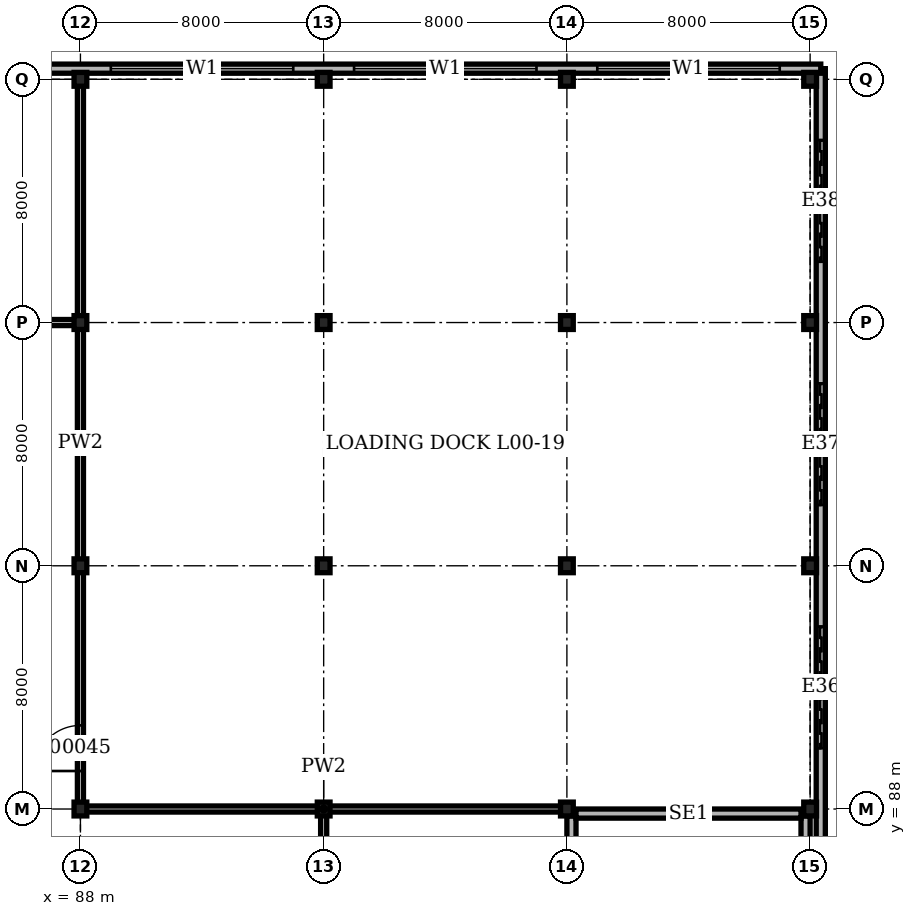
"""IFC4 building model, lengths in metres.
Left out: names, types, materials, properties, quantities, classifications, styles, units other than length and angle.
Written with IfcOpenShell. Run it as: python <this file> out.ifc"""

import sys

from ifc_helpers import new_model, si_unit, direction, frame, frame_2d, origin, origin_2d, place, context, subcontext, project, spatial, rectangle, i_section, extrude, element, fill, save


model = new_model("IFC4")
c1 = context("Model", 3, precision=1e-05, world=origin(), true_north=direction((0.0, 1.0)))
c2 = subcontext(c1, "Body", "Model", "MODEL_VIEW")
j1 = project(units=[si_unit("LENGTHUNIT", "METRE"), si_unit("PLANEANGLEUNIT", "RADIAN")], contexts=[c1])
p1 = place(None, origin())
s1 = spatial("IfcSite", under=j1, at=p1, CompositionType="ELEMENT")
p2 = place(p1, origin())
s2 = spatial("IfcBuilding", under=s1, at=p2, CompositionType="ELEMENT")
p3 = place(p2, origin())
s3 = spatial("IfcBuildingStorey", under=s2, at=p3, CompositionType="ELEMENT", Elevation=0.0)
for number, where, z_axis, x_axis in (
    (1, (88.0, 88.0, 0.0), (0.0, 0.0, 1.0), (1.0, 0.0, 0.0)),
    (2, (88.0, 96.0, 0.0), (0.0, 0.0, 1.0), (1.0, 0.0, 0.0)),
    (3, (88.0, 104.0, 0.0), (0.0, 0.0, 1.0), (1.0, 0.0, 0.0)),
    (4, (88.0, 112.0, 0.0), (0.0, 0.0, 1.0), (1.0, 0.0, 0.0)),
    (5, (96.0, 88.0, 0.0), (0.0, 0.0, 1.0), (1.0, 0.0, 0.0)),
    (6, (96.0, 96.0, 0.0), (0.0, 0.0, 1.0), (1.0, 0.0, 0.0)),
    (7, (96.0, 104.0, 0.0), (0.0, 0.0, 1.0), (1.0, 0.0, 0.0)),
    (8, (96.0, 112.0, 0.0), (0.0, 0.0, 1.0), (1.0, 0.0, 0.0)),
    (9, (104.0, 88.0, 0.0), (0.0, 0.0, 1.0), (1.0, 0.0, 0.0)),
    (10, (104.0, 96.0, 0.0), (0.0, 0.0, 1.0), (1.0, 0.0, 0.0)),
    (11, (104.0, 104.0, 0.0), (0.0, 0.0, 1.0), (1.0, 0.0, 0.0)),
    (12, (104.0, 112.0, 0.0), (0.0, 0.0, 1.0), (1.0, 0.0, 0.0)),
    (13, (112.0, 88.0, 0.0), (0.0, 0.0, 1.0), (1.0, 0.0, 0.0)),
    (14, (112.0, 96.0, 0.0), (0.0, 0.0, 1.0), (1.0, 0.0, 0.0)),
    (15, (112.0, 104.0, 0.0), (0.0, 0.0, 1.0), (1.0, 0.0, 0.0)),
    (16, (112.0, 112.0, 0.0), (0.0, 0.0, 1.0), (1.0, 0.0, 0.0)),
):
    element("IfcColumn", number, at=place(p3, frame(where, z_axis=z_axis, x_axis=x_axis)), inside=s3, PredefinedType="COLUMN", context=c2, shape_type="SweptSolid", body=[
        extrude(i_section(OverallWidth=0.419, OverallDepth=0.455, WebThickness=0.042, FlangeThickness=0.068, at=origin_2d()), origin(), (0.0, 0.0, 1.0), 4.9),
    ])
p4 = place(p3, frame((112.35, -0.35, 0.0), z_axis=(0.0, 0.0, 1.0), x_axis=(0.0, 1.0, 0.0)))
e17 = element("IfcWall", 17, at=p4, inside=s3, PredefinedType="SOLIDWALL", context=c2, shape_type="SweptSolid", body=[
    extrude(rectangle(XDim=112.7, YDim=0.3, at=frame_2d((56.35, 0.0))), origin(), (0.0, 0.0, 1.0), 4.9),
])
p5 = place(p4, frame((3.45, 0.0, 0.0)))
e18 = element("IfcOpeningElement", 18, at=p5, cuts=e17, PredefinedType="OPENING", context=c2, shape_type="SweptSolid", body=[
    extrude(rectangle(XDim=1.8, YDim=2.4, at=frame_2d((0.9, 1.2))), frame((0.0, 0.16, 0.0), z_axis=(0.0, -1.0, 0.0), x_axis=(1.0, 0.0, 0.0)), (0.0, 0.0, 1.0), 0.32),
])
p6 = place(p4, frame((11.45, 0.0, 0.0)))
e19 = element("IfcOpeningElement", 19, at=p6, cuts=e17, PredefinedType="OPENING", context=c2, shape_type="SweptSolid", body=[
    extrude(rectangle(XDim=1.8, YDim=2.4, at=frame_2d((0.9, 1.2))), frame((0.0, 0.16, 0.0), z_axis=(0.0, -1.0, 0.0), x_axis=(1.0, 0.0, 0.0)), (0.0, 0.0, 1.0), 0.32),
])
p7 = place(p4, frame((17.35, 0.0, 1.2)))
e20 = element("IfcOpeningElement", 20, at=p7, cuts=e17, PredefinedType="OPENING", context=c2, shape_type="SweptSolid", body=[
    extrude(rectangle(XDim=6.0, YDim=1.5, at=frame_2d((3.0, 0.75))), frame((0.0, 0.16, 0.0), z_axis=(0.0, -1.0, 0.0), x_axis=(1.0, 0.0, 0.0)), (0.0, 0.0, 1.0), 0.32),
])
p8 = place(p4, frame((25.35, 0.0, 1.2)))
e21 = element("IfcOpeningElement", 21, at=p8, cuts=e17, PredefinedType="OPENING", context=c2, shape_type="SweptSolid", body=[
    extrude(rectangle(XDim=6.0, YDim=1.5, at=frame_2d((3.0, 0.75))), frame((0.0, 0.16, 0.0), z_axis=(0.0, -1.0, 0.0), x_axis=(1.0, 0.0, 0.0)), (0.0, 0.0, 1.0), 0.32),
])
p9 = place(p4, frame((33.35, 0.0, 1.2)))
e22 = element("IfcOpeningElement", 22, at=p9, cuts=e17, PredefinedType="OPENING", context=c2, shape_type="SweptSolid", body=[
    extrude(rectangle(XDim=6.0, YDim=1.5, at=frame_2d((3.0, 0.75))), frame((0.0, 0.16, 0.0), z_axis=(0.0, -1.0, 0.0), x_axis=(1.0, 0.0, 0.0)), (0.0, 0.0, 1.0), 0.32),
])
p10 = place(p4, frame((41.35, 0.0, 1.2)))
e23 = element("IfcOpeningElement", 23, at=p10, cuts=e17, PredefinedType="OPENING", context=c2, shape_type="SweptSolid", body=[
    extrude(rectangle(XDim=6.0, YDim=1.5, at=frame_2d((3.0, 0.75))), frame((0.0, 0.16, 0.0), z_axis=(0.0, -1.0, 0.0), x_axis=(1.0, 0.0, 0.0)), (0.0, 0.0, 1.0), 0.32),
])
p11 = place(p4, frame((49.45, 0.0, 0.0)))
e24 = element("IfcOpeningElement", 24, at=p11, cuts=e17, PredefinedType="OPENING", context=c2, shape_type="SweptSolid", body=[
    extrude(rectangle(XDim=1.8, YDim=2.4, at=frame_2d((0.9, 1.2))), frame((0.0, 0.16, 0.0), z_axis=(0.0, -1.0, 0.0), x_axis=(1.0, 0.0, 0.0)), (0.0, 0.0, 1.0), 0.32),
])
p12 = place(p4, frame((53.45, 0.0, 0.0)))
e25 = element("IfcOpeningElement", 25, at=p12, cuts=e17, PredefinedType="OPENING", context=c2, shape_type="SweptSolid", body=[
    extrude(rectangle(XDim=1.8, YDim=2.4, at=frame_2d((0.9, 1.2))), frame((0.0, 0.16, 0.0), z_axis=(0.0, -1.0, 0.0), x_axis=(1.0, 0.0, 0.0)), (0.0, 0.0, 1.0), 0.32),
])
p13 = place(p4, frame((57.35, 0.0, 1.2)))
e26 = element("IfcOpeningElement", 26, at=p13, cuts=e17, PredefinedType="OPENING", context=c2, shape_type="SweptSolid", body=[
    extrude(rectangle(XDim=6.0, YDim=1.5, at=frame_2d((3.0, 0.75))), frame((0.0, 0.16, 0.0), z_axis=(0.0, -1.0, 0.0), x_axis=(1.0, 0.0, 0.0)), (0.0, 0.0, 1.0), 0.32),
])
p14 = place(p4, frame((65.15, 0.0, 0.0)))
e27 = element("IfcOpeningElement", 27, at=p14, cuts=e17, PredefinedType="OPENING", context=c2, shape_type="SweptSolid", body=[
    extrude(rectangle(XDim=2.4, YDim=3.0, at=frame_2d((1.2, 1.5))), frame((0.0, 0.16, 0.0), z_axis=(0.0, -1.0, 0.0), x_axis=(1.0, 0.0, 0.0)), (0.0, 0.0, 1.0), 0.32),
])
p15 = place(p4, frame((69.15, 0.0, 0.0)))
e28 = element("IfcOpeningElement", 28, at=p15, cuts=e17, PredefinedType="OPENING", context=c2, shape_type="SweptSolid", body=[
    extrude(rectangle(XDim=2.4, YDim=3.0, at=frame_2d((1.2, 1.5))), frame((0.0, 0.16, 0.0), z_axis=(0.0, -1.0, 0.0), x_axis=(1.0, 0.0, 0.0)), (0.0, 0.0, 1.0), 0.32),
])
p16 = place(p4, frame((74.05, 0.0, 0.0)))
e29 = element("IfcOpeningElement", 29, at=p16, cuts=e17, PredefinedType="OPENING", context=c2, shape_type="SweptSolid", body=[
    extrude(rectangle(XDim=1.8, YDim=2.4, at=frame_2d((0.9, 1.2))), frame((0.0, 0.16, 0.0), z_axis=(0.0, -1.0, 0.0), x_axis=(1.0, 0.0, 0.0)), (0.0, 0.0, 1.0), 0.32),
])
p17 = place(p4, frame((81.35, 0.0, 1.2)))
e30 = element("IfcOpeningElement", 30, at=p17, cuts=e17, PredefinedType="OPENING", context=c2, shape_type="SweptSolid", body=[
    extrude(rectangle(XDim=6.0, YDim=1.5, at=frame_2d((3.0, 0.75))), frame((0.0, 0.16, 0.0), z_axis=(0.0, -1.0, 0.0), x_axis=(1.0, 0.0, 0.0)), (0.0, 0.0, 1.0), 0.32),
])
p18 = place(p4, frame((90.35, 0.0, 0.0)))
e31 = element("IfcOpeningElement", 31, at=p18, cuts=e17, PredefinedType="OPENING", context=c2, shape_type="SweptSolid", body=[
    extrude(rectangle(XDim=4.0, YDim=4.5, at=frame_2d((2.0, 2.25))), frame((0.0, 0.16, 0.0), z_axis=(0.0, -1.0, 0.0), x_axis=(1.0, 0.0, 0.0)), (0.0, 0.0, 1.0), 0.32),
])
p19 = place(p4, frame((98.35, 0.0, 0.0)))
e32 = element("IfcOpeningElement", 32, at=p19, cuts=e17, PredefinedType="OPENING", context=c2, shape_type="SweptSolid", body=[
    extrude(rectangle(XDim=4.0, YDim=4.5, at=frame_2d((2.0, 2.25))), frame((0.0, 0.16, 0.0), z_axis=(0.0, -1.0, 0.0), x_axis=(1.0, 0.0, 0.0)), (0.0, 0.0, 1.0), 0.32),
])
p20 = place(p4, frame((106.35, 0.0, 0.0)))
e33 = element("IfcOpeningElement", 33, at=p20, cuts=e17, PredefinedType="OPENING", context=c2, shape_type="SweptSolid", body=[
    extrude(rectangle(XDim=4.0, YDim=4.5, at=frame_2d((2.0, 2.25))), frame((0.0, 0.16, 0.0), z_axis=(0.0, -1.0, 0.0), x_axis=(1.0, 0.0, 0.0)), (0.0, 0.0, 1.0), 0.32),
])
p21 = place(p3, frame((112.35, 112.35, 0.0), z_axis=(0.0, 0.0, 1.0), x_axis=(-1.0, 0.0, 0.0)))
e34 = element("IfcWall", 34, at=p21, inside=s3, PredefinedType="SOLIDWALL", context=c2, shape_type="SweptSolid", body=[
    extrude(rectangle(XDim=112.7, YDim=0.3, at=frame_2d((56.35, 0.0))), origin(), (0.0, 0.0, 1.0), 4.9),
])
p22 = place(p21, frame((1.35, 0.0, 1.2)))
e35 = element("IfcOpeningElement", 35, at=p22, cuts=e34, PredefinedType="OPENING", context=c2, shape_type="SweptSolid", body=[
    extrude(rectangle(XDim=6.0, YDim=1.5, at=frame_2d((3.0, 0.75))), frame((0.0, 0.16, 0.0), z_axis=(0.0, -1.0, 0.0), x_axis=(1.0, 0.0, 0.0)), (0.0, 0.0, 1.0), 0.32),
])
p23 = place(p21, frame((9.35, 0.0, 1.2)))
e36 = element("IfcOpeningElement", 36, at=p23, cuts=e34, PredefinedType="OPENING", context=c2, shape_type="SweptSolid", body=[
    extrude(rectangle(XDim=6.0, YDim=1.5, at=frame_2d((3.0, 0.75))), frame((0.0, 0.16, 0.0), z_axis=(0.0, -1.0, 0.0), x_axis=(1.0, 0.0, 0.0)), (0.0, 0.0, 1.0), 0.32),
])
p24 = place(p21, frame((17.35, 0.0, 1.2)))
e37 = element("IfcOpeningElement", 37, at=p24, cuts=e34, PredefinedType="OPENING", context=c2, shape_type="SweptSolid", body=[
    extrude(rectangle(XDim=6.0, YDim=1.5, at=frame_2d((3.0, 0.75))), frame((0.0, 0.16, 0.0), z_axis=(0.0, -1.0, 0.0), x_axis=(1.0, 0.0, 0.0)), (0.0, 0.0, 1.0), 0.32),
])
p25 = place(p21, frame((25.35, 0.0, 1.2)))
e38 = element("IfcOpeningElement", 38, at=p25, cuts=e34, PredefinedType="OPENING", context=c2, shape_type="SweptSolid", body=[
    extrude(rectangle(XDim=6.0, YDim=1.5, at=frame_2d((3.0, 0.75))), frame((0.0, 0.16, 0.0), z_axis=(0.0, -1.0, 0.0), x_axis=(1.0, 0.0, 0.0)), (0.0, 0.0, 1.0), 0.32),
])
p26 = place(p21, frame((33.35, 0.0, 1.2)))
e39 = element("IfcOpeningElement", 39, at=p26, cuts=e34, PredefinedType="OPENING", context=c2, shape_type="SweptSolid", body=[
    extrude(rectangle(XDim=6.0, YDim=1.5, at=frame_2d((3.0, 0.75))), frame((0.0, 0.16, 0.0), z_axis=(0.0, -1.0, 0.0), x_axis=(1.0, 0.0, 0.0)), (0.0, 0.0, 1.0), 0.32),
])
p27 = place(p21, frame((41.35, 0.0, 1.2)))
e40 = element("IfcOpeningElement", 40, at=p27, cuts=e34, PredefinedType="OPENING", context=c2, shape_type="SweptSolid", body=[
    extrude(rectangle(XDim=6.0, YDim=1.5, at=frame_2d((3.0, 0.75))), frame((0.0, 0.16, 0.0), z_axis=(0.0, -1.0, 0.0), x_axis=(1.0, 0.0, 0.0)), (0.0, 0.0, 1.0), 0.32),
])
p28 = place(p21, frame((49.35, 0.0, 1.2)))
e41 = element("IfcOpeningElement", 41, at=p28, cuts=e34, PredefinedType="OPENING", context=c2, shape_type="SweptSolid", body=[
    extrude(rectangle(XDim=6.0, YDim=1.5, at=frame_2d((3.0, 0.75))), frame((0.0, 0.16, 0.0), z_axis=(0.0, -1.0, 0.0), x_axis=(1.0, 0.0, 0.0)), (0.0, 0.0, 1.0), 0.32),
])
p29 = place(p21, frame((57.35, 0.0, 1.2)))
e42 = element("IfcOpeningElement", 42, at=p29, cuts=e34, PredefinedType="OPENING", context=c2, shape_type="SweptSolid", body=[
    extrude(rectangle(XDim=6.0, YDim=1.5, at=frame_2d((3.0, 0.75))), frame((0.0, 0.16, 0.0), z_axis=(0.0, -1.0, 0.0), x_axis=(1.0, 0.0, 0.0)), (0.0, 0.0, 1.0), 0.32),
])
p30 = place(p21, frame((65.35, 0.0, 1.2)))
e43 = element("IfcOpeningElement", 43, at=p30, cuts=e34, PredefinedType="OPENING", context=c2, shape_type="SweptSolid", body=[
    extrude(rectangle(XDim=6.0, YDim=1.5, at=frame_2d((3.0, 0.75))), frame((0.0, 0.16, 0.0), z_axis=(0.0, -1.0, 0.0), x_axis=(1.0, 0.0, 0.0)), (0.0, 0.0, 1.0), 0.32),
])
p31 = place(p21, frame((73.35, 0.0, 1.2)))
e44 = element("IfcOpeningElement", 44, at=p31, cuts=e34, PredefinedType="OPENING", context=c2, shape_type="SweptSolid", body=[
    extrude(rectangle(XDim=6.0, YDim=1.5, at=frame_2d((3.0, 0.75))), frame((0.0, 0.16, 0.0), z_axis=(0.0, -1.0, 0.0), x_axis=(1.0, 0.0, 0.0)), (0.0, 0.0, 1.0), 0.32),
])
p32 = place(p21, frame((81.35, 0.0, 1.2)))
e45 = element("IfcOpeningElement", 45, at=p32, cuts=e34, PredefinedType="OPENING", context=c2, shape_type="SweptSolid", body=[
    extrude(rectangle(XDim=6.0, YDim=1.5, at=frame_2d((3.0, 0.75))), frame((0.0, 0.16, 0.0), z_axis=(0.0, -1.0, 0.0), x_axis=(1.0, 0.0, 0.0)), (0.0, 0.0, 1.0), 0.32),
])
p33 = place(p21, frame((89.35, 0.0, 1.2)))
e46 = element("IfcOpeningElement", 46, at=p33, cuts=e34, PredefinedType="OPENING", context=c2, shape_type="SweptSolid", body=[
    extrude(rectangle(XDim=6.0, YDim=1.5, at=frame_2d((3.0, 0.75))), frame((0.0, 0.16, 0.0), z_axis=(0.0, -1.0, 0.0), x_axis=(1.0, 0.0, 0.0)), (0.0, 0.0, 1.0), 0.32),
])
p34 = place(p21, frame((97.35, 0.0, 1.2)))
e47 = element("IfcOpeningElement", 47, at=p34, cuts=e34, PredefinedType="OPENING", context=c2, shape_type="SweptSolid", body=[
    extrude(rectangle(XDim=6.0, YDim=1.5, at=frame_2d((3.0, 0.75))), frame((0.0, 0.16, 0.0), z_axis=(0.0, -1.0, 0.0), x_axis=(1.0, 0.0, 0.0)), (0.0, 0.0, 1.0), 0.32),
])
p35 = place(p21, frame((105.35, 0.0, 1.2)))
e48 = element("IfcOpeningElement", 48, at=p35, cuts=e34, PredefinedType="OPENING", context=c2, shape_type="SweptSolid", body=[
    extrude(rectangle(XDim=6.0, YDim=1.5, at=frame_2d((3.0, 0.75))), frame((0.0, 0.16, 0.0), z_axis=(0.0, -1.0, 0.0), x_axis=(1.0, 0.0, 0.0)), (0.0, 0.0, 1.0), 0.32),
])
for number, where, z_axis, x_axis in (
    (49, (104.15, 77.15, 0.0), (0.0, 0.0, 1.0), (0.0, 1.0, 0.0)),
    (50, (111.85, 77.15, 0.0), (0.0, 0.0, 1.0), (0.0, 1.0, 0.0)),
):
    element("IfcWall", number, at=place(p3, frame(where, z_axis=z_axis, x_axis=x_axis)), inside=s3, PredefinedType="SOLIDWALL", context=c2, shape_type="SweptSolid", body=[
        extrude(rectangle(XDim=10.623, YDim=0.3, at=frame_2d((5.312, 0.0))), origin(), (0.0, 0.0, 1.0), 4.7),
    ])
p36 = place(p3, frame((104.3, 87.85, 0.0), z_axis=(0.0, 0.0, 1.0), x_axis=(1.0, 0.0, 0.0)))
e51 = element("IfcWall", 51, at=p36, inside=s3, PredefinedType="SOLIDWALL", context=c2, shape_type="SweptSolid", body=[
    extrude(rectangle(XDim=7.4, YDim=0.3, at=frame_2d((3.7, 0.0))), origin(), (0.0, 0.0, 1.0), 4.7),
])
p37 = place(p3, frame((88.1, 88.0, 0.0), z_axis=(0.0, 0.0, 1.0), x_axis=(1.0, 0.0, 0.0)))
e52 = element("IfcWall", 52, at=p37, inside=s3, PredefinedType="PARTITIONING", context=c2, shape_type="SweptSolid", body=[
    extrude(rectangle(XDim=15.8, YDim=0.2, at=frame_2d((7.9, 0.0))), origin(), (0.0, 0.0, 1.0), 3.928),
])
p38 = place(p3, frame((80.1, 104.0, 0.0), z_axis=(0.0, 0.0, 1.0), x_axis=(1.0, 0.0, 0.0)))
e53 = element("IfcWall", 53, at=p38, inside=s3, PredefinedType="PARTITIONING", context=c2, shape_type="SweptSolid", body=[
    extrude(rectangle(XDim=7.8, YDim=0.2, at=frame_2d((3.9, 0.0))), origin(), (0.0, 0.0, 1.0), 3.928),
])
p39 = place(p38, frame((3.4, 0.0, 0.0)))
e54 = element("IfcOpeningElement", 54, at=p39, cuts=e53, PredefinedType="OPENING", context=c2, shape_type="SweptSolid", body=[
    extrude(rectangle(XDim=1.0, YDim=2.1, at=frame_2d((0.5, 1.05))), frame((0.0, 0.11, 0.0), z_axis=(0.0, -1.0, 0.0), x_axis=(1.0, 0.0, 0.0)), (0.0, 0.0, 1.0), 0.22),
])
p40 = place(p3, frame((88.0, 88.1, 0.0), z_axis=(0.0, 0.0, 1.0), x_axis=(0.0, 1.0, 0.0)))
e55 = element("IfcWall", 55, at=p40, inside=s3, PredefinedType="PARTITIONING", context=c2, shape_type="SweptSolid", body=[
    extrude(rectangle(XDim=23.9, YDim=0.2, at=frame_2d((11.95, 0.0))), origin(), (0.0, 0.0, 1.0), 3.928),
])
p41 = place(p40, frame((1.15, 0.0, 0.0)))
e56 = element("IfcOpeningElement", 56, at=p41, cuts=e55, PredefinedType="OPENING", context=c2, shape_type="SweptSolid", body=[
    extrude(rectangle(XDim=1.5, YDim=2.4, at=frame_2d((0.75, 1.2))), frame((0.0, 0.11, 0.0), z_axis=(0.0, -1.0, 0.0), x_axis=(1.0, 0.0, 0.0)), (0.0, 0.0, 1.0), 0.22),
])
p42 = place(p3, frame((96.0, 80.1, 0.0), z_axis=(0.0, 0.0, 1.0), x_axis=(0.0, 1.0, 0.0)))
e57 = element("IfcWall", 57, at=p42, inside=s3, PredefinedType="PARTITIONING", context=c2, shape_type="SweptSolid", body=[
    extrude(rectangle(XDim=7.8, YDim=0.2, at=frame_2d((3.9, 0.0))), origin(), (0.0, 0.0, 1.0), 3.928),
])
p43 = place(p42, frame((1.15, 0.0, 0.0)))
e58 = element("IfcOpeningElement", 58, at=p43, cuts=e57, PredefinedType="OPENING", context=c2, shape_type="SweptSolid", body=[
    extrude(rectangle(XDim=1.5, YDim=2.4, at=frame_2d((0.75, 1.2))), frame((0.0, 0.11, 0.0), z_axis=(0.0, -1.0, 0.0), x_axis=(1.0, 0.0, 0.0)), (0.0, 0.0, 1.0), 0.22),
])
p44 = place(p18, frame((4.0, 0.0, 0.0), z_axis=(0.0, 0.0, 1.0), x_axis=(-1.0, 0.0, 0.0)))
e59 = element("IfcDoor", 59, at=p44, inside=s3, OperationType="ROLLINGUP", PredefinedType="DOOR", context=c2, shape_type="SweptSolid", body=[
    extrude(rectangle(XDim=4.0, YDim=4.5, at=frame_2d((2.0, 2.25))), frame((0.0, 0.15, 0.0), z_axis=(0.0, -1.0, 0.0), x_axis=(1.0, 0.0, 0.0)), (0.0, 0.0, 1.0), 0.3),
])
fill(e31, e59)
p45 = place(p19, frame((4.0, 0.0, 0.0), z_axis=(0.0, 0.0, 1.0), x_axis=(-1.0, 0.0, 0.0)))
e60 = element("IfcDoor", 60, at=p45, inside=s3, OperationType="ROLLINGUP", PredefinedType="DOOR", context=c2, shape_type="SweptSolid", body=[
    extrude(rectangle(XDim=4.0, YDim=4.5, at=frame_2d((2.0, 2.25))), frame((0.0, 0.15, 0.0), z_axis=(0.0, -1.0, 0.0), x_axis=(1.0, 0.0, 0.0)), (0.0, 0.0, 1.0), 0.3),
])
fill(e32, e60)
p46 = place(p20, frame((4.0, 0.0, 0.0), z_axis=(0.0, 0.0, 1.0), x_axis=(-1.0, 0.0, 0.0)))
e61 = element("IfcDoor", 61, at=p46, inside=s3, OperationType="ROLLINGUP", PredefinedType="DOOR", context=c2, shape_type="SweptSolid", body=[
    extrude(rectangle(XDim=4.0, YDim=4.5, at=frame_2d((2.0, 2.25))), frame((0.0, 0.15, 0.0), z_axis=(0.0, -1.0, 0.0), x_axis=(1.0, 0.0, 0.0)), (0.0, 0.0, 1.0), 0.3),
])
fill(e33, e61)
p47 = place(p22, origin())
e62 = element("IfcWindow", 62, at=p47, inside=s3, PartitioningType="SINGLE_PANEL", PredefinedType="WINDOW", context=c2, shape_type="SweptSolid", body=[
    extrude(rectangle(XDim=6.0, YDim=1.5, at=frame_2d((3.0, 0.75))), frame((0.0, 0.03, 0.0), z_axis=(0.0, -1.0, 0.0), x_axis=(1.0, 0.0, 0.0)), (0.0, 0.0, 1.0), 0.06),
])
fill(e35, e62)
p48 = place(p23, origin())
e63 = element("IfcWindow", 63, at=p48, inside=s3, PartitioningType="SINGLE_PANEL", PredefinedType="WINDOW", context=c2, shape_type="SweptSolid", body=[
    extrude(rectangle(XDim=6.0, YDim=1.5, at=frame_2d((3.0, 0.75))), frame((0.0, 0.03, 0.0), z_axis=(0.0, -1.0, 0.0), x_axis=(1.0, 0.0, 0.0)), (0.0, 0.0, 1.0), 0.06),
])
fill(e36, e63)
p49 = place(p24, origin())
e64 = element("IfcWindow", 64, at=p49, inside=s3, PartitioningType="SINGLE_PANEL", PredefinedType="WINDOW", context=c2, shape_type="SweptSolid", body=[
    extrude(rectangle(XDim=6.0, YDim=1.5, at=frame_2d((3.0, 0.75))), frame((0.0, 0.03, 0.0), z_axis=(0.0, -1.0, 0.0), x_axis=(1.0, 0.0, 0.0)), (0.0, 0.0, 1.0), 0.06),
])
fill(e37, e64)
p50 = place(p41, origin())
e65 = element("IfcDoor", 65, at=p50, inside=s3, OperationType="DOUBLE_DOOR_SINGLE_SWING", PredefinedType="DOOR", context=c2, shape_type="SweptSolid", body=[
    extrude(rectangle(XDim=1.5, YDim=2.4, at=frame_2d((0.75, 1.2))), frame((0.0, 0.1, 0.0), z_axis=(0.0, -1.0, 0.0), x_axis=(1.0, 0.0, 0.0)), (0.0, 0.0, 1.0), 0.199),
])
fill(e56, e65)
save(model, sys.argv[1])
